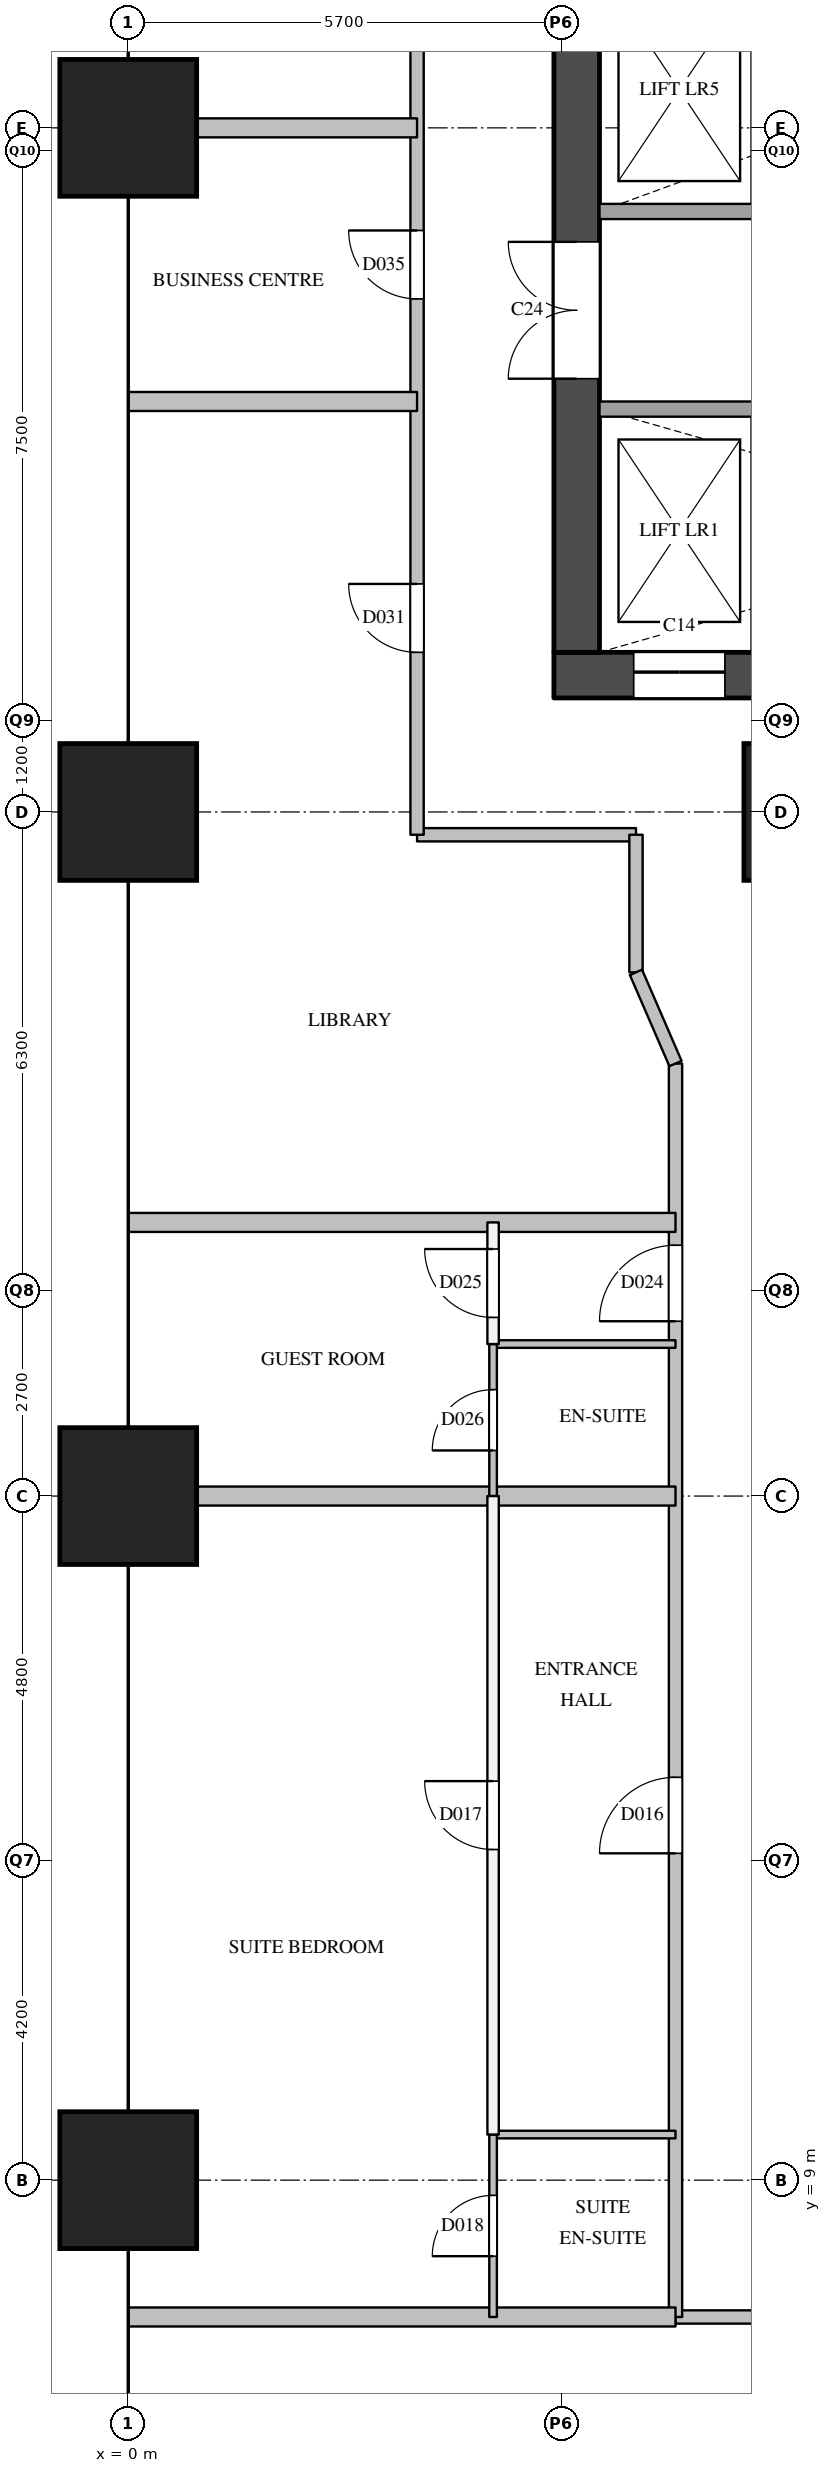
"""IFC4 building model, lengths in metres.
Left out: names, types, materials, properties, quantities, classifications, styles, units other than length and angle.
Written with IfcOpenShell. Run it as: python <this file> out.ifc"""

import sys

from ifc_helpers import new_model, si_unit, direction, frame, frame_2d, origin, origin_2d, place, context, subcontext, project, spatial, rectangle, extrude, element, fill, save


model = new_model("IFC4")
c1 = context("Model", 3, precision=1e-05, world=origin(), true_north=direction((0.0, 1.0)))
c2 = subcontext(c1, "Body", "Model", "MODEL_VIEW")
j1 = project(units=[si_unit("LENGTHUNIT", "METRE"), si_unit("PLANEANGLEUNIT", "RADIAN")], contexts=[c1])
p1 = place(None, origin())
s1 = spatial("IfcSite", under=j1, at=p1, CompositionType="ELEMENT")
p2 = place(p1, origin())
s2 = spatial("IfcBuilding", under=s1, at=p2, CompositionType="ELEMENT")
p3 = place(p2, frame((0.0, 0.0, 57.6)))
s3 = spatial("IfcBuildingStorey", under=s2, at=p3, CompositionType="ELEMENT", Elevation=57.6)
for number, where, z_axis, x_axis in (
    (1, (0.0, 9.0, 0.0), (0.0, 0.0, 1.0), (1.0, 0.0, 0.0)),
    (2, (0.0, 18.0, 0.0), (0.0, 0.0, 1.0), (1.0, 0.0, 0.0)),
    (3, (0.0, 27.0, 0.0), (0.0, 0.0, 1.0), (1.0, 0.0, 0.0)),
    (4, (0.0, 36.0, 0.0), (0.0, 0.0, 1.0), (1.0, 0.0, 0.0)),
    (5, (9.0, 27.0, 0.0), (0.0, 0.0, 1.0), (1.0, 0.0, 0.0)),
):
    element("IfcColumn", number, at=place(p3, frame(where, z_axis=z_axis, x_axis=x_axis)), inside=s3, PredefinedType="COLUMN", context=c2, shape_type="SweptSolid", body=[
        extrude(rectangle(XDim=1.8, YDim=1.8, at=origin_2d()), origin(), (0.0, 0.0, 1.0), 3.8),
    ])
p4 = place(p3, frame((5.6, 28.8, 0.0), z_axis=(0.0, 0.0, 1.0), x_axis=(1.0, 0.0, 0.0)))
e6 = element("IfcWall", 6, at=p4, inside=s3, PredefinedType="SHEAR", context=c2, shape_type="SweptSolid", body=[
    extrude(rectangle(XDim=12.4, YDim=0.6, at=frame_2d((6.2, 0.0))), origin(), (0.0, 0.0, 1.0), 3.5),
])
p5 = place(p4, frame((1.05, 0.0, 0.0)))
e7 = element("IfcOpeningElement", 7, at=p5, cuts=e6, PredefinedType="OPENING", context=c2, shape_type="SweptSolid", body=[
    extrude(rectangle(XDim=1.2, YDim=2.1, at=frame_2d((0.6, 1.05))), frame((0.0, 0.31, 0.0), z_axis=(0.0, -1.0, 0.0), x_axis=(1.0, 0.0, 0.0)), (0.0, 0.0, 1.0), 0.62),
])
p6 = place(p4, frame((5.25, 0.0, 0.0)))
e8 = element("IfcOpeningElement", 8, at=p6, cuts=e6, PredefinedType="OPENING", context=c2, shape_type="SweptSolid", body=[
    extrude(rectangle(XDim=1.2, YDim=2.1, at=frame_2d((0.6, 1.05))), frame((0.0, 0.31, 0.0), z_axis=(0.0, -1.0, 0.0), x_axis=(1.0, 0.0, 0.0)), (0.0, 0.0, 1.0), 0.62),
])
p7 = place(p4, frame((7.35, 0.0, 0.0)))
e9 = element("IfcOpeningElement", 9, at=p7, cuts=e6, PredefinedType="OPENING", context=c2, shape_type="SweptSolid", body=[
    extrude(rectangle(XDim=1.2, YDim=2.1, at=frame_2d((0.6, 1.05))), frame((0.0, 0.31, 0.0), z_axis=(0.0, -1.0, 0.0), x_axis=(1.0, 0.0, 0.0)), (0.0, 0.0, 1.0), 0.62),
])
p8 = place(p3, frame((5.9, 29.1, 0.0), z_axis=(0.0, 0.0, 1.0), x_axis=(0.0, 1.0, 0.0)))
e10 = element("IfcWall", 10, at=p8, inside=s3, PredefinedType="SHEAR", context=c2, shape_type="SweptSolid", body=[
    extrude(rectangle(XDim=20.3, YDim=0.6, at=frame_2d((10.15, 0.0))), origin(), (0.0, 0.0, 1.0), 3.5),
])
p9 = place(p8, frame((3.6, 0.0, 0.0)))
e11 = element("IfcOpeningElement", 11, at=p9, cuts=e10, PredefinedType="OPENING", context=c2, shape_type="SweptSolid", body=[
    extrude(rectangle(XDim=1.8, YDim=2.1, at=frame_2d((0.9, 1.05))), frame((0.0, 0.31, 0.0), z_axis=(0.0, -1.0, 0.0), x_axis=(1.0, 0.0, 0.0)), (0.0, 0.0, 1.0), 0.62),
])
p10 = place(p8, frame((16.4, 0.0, 0.0)))
e12 = element("IfcOpeningElement", 12, at=p10, cuts=e10, PredefinedType="OPENING", context=c2, shape_type="SweptSolid", body=[
    extrude(rectangle(XDim=1.0, YDim=2.1, at=frame_2d((0.5, 1.05))), frame((0.0, 0.31, 0.0), z_axis=(0.0, -1.0, 0.0), x_axis=(1.0, 0.0, 0.0)), (0.0, 0.0, 1.0), 0.62),
])
p11 = place(p3, frame((6.2, 32.3, 0.0), z_axis=(0.0, 0.0, 1.0), x_axis=(1.0, 0.0, 0.0)))
e13 = element("IfcWall", 13, at=p11, inside=s3, PredefinedType="SOLIDWALL", context=c2, shape_type="SweptSolid", body=[
    extrude(rectangle(XDim=11.2, YDim=0.2, at=frame_2d((5.6, 0.0))), origin(), (0.0, 0.0, 1.0), 3.5),
])
p12 = place(p11, frame((2.55, 0.0, 0.0)))
e14 = element("IfcOpeningElement", 14, at=p12, cuts=e13, PredefinedType="OPENING", context=c2, shape_type="SweptSolid", body=[
    extrude(rectangle(XDim=1.2, YDim=2.1, at=frame_2d((0.6, 1.05))), frame((0.0, 0.11, 0.0), z_axis=(0.0, -1.0, 0.0), x_axis=(1.0, 0.0, 0.0)), (0.0, 0.0, 1.0), 0.22),
])
p13 = place(p3, frame((6.2, 34.9, 0.0), z_axis=(0.0, 0.0, 1.0), x_axis=(1.0, 0.0, 0.0)))
e15 = element("IfcWall", 15, at=p13, inside=s3, PredefinedType="SOLIDWALL", context=c2, shape_type="SweptSolid", body=[
    extrude(rectangle(XDim=11.2, YDim=0.2, at=frame_2d((5.6, 0.0))), origin(), (0.0, 0.0, 1.0), 3.5),
])
p14 = place(p3, frame((7.2, 7.2, 0.0), z_axis=(0.0, 0.0, 1.0), x_axis=(1.0, 0.0, 0.0)))
e16 = element("IfcWall", 16, at=p14, inside=s3, PredefinedType="PARTITIONING", context=c2, shape_type="SweptSolid", body=[
    extrude(rectangle(XDim=12.6, YDim=0.175, at=frame_2d((6.3, 0.0))), origin(), (0.0, 0.0, 1.0), 3.5),
])
p15 = place(p14, frame((7.5, 0.0, 0.0)))
e17 = element("IfcOpeningElement", 17, at=p15, cuts=e16, PredefinedType="OPENING", context=c2, shape_type="SweptSolid", body=[
    extrude(rectangle(XDim=1.0, YDim=2.1, at=frame_2d((0.5, 1.05))), frame((0.0, 0.097, 0.0), z_axis=(0.0, -1.0, 0.0), x_axis=(1.0, 0.0, 0.0)), (0.0, 0.0, 1.0), 0.195),
])
p16 = place(p14, frame((1.9, 0.0, 0.0)))
e18 = element("IfcOpeningElement", 18, at=p16, cuts=e16, PredefinedType="OPENING", context=c2, shape_type="SweptSolid", body=[
    extrude(rectangle(XDim=1.0, YDim=2.1, at=frame_2d((0.5, 1.05))), frame((0.0, 0.097, 0.0), z_axis=(0.0, -1.0, 0.0), x_axis=(1.0, 0.0, 0.0)), (0.0, 0.0, 1.0), 0.195),
])
p17 = place(p3, frame((3.8, 26.7, 0.0), z_axis=(0.0, 0.0, 1.0), x_axis=(1.0, 0.0, 0.0)))
e19 = element("IfcWall", 19, at=p17, inside=s3, PredefinedType="PARTITIONING", context=c2, shape_type="SweptSolid", body=[
    extrude(rectangle(XDim=2.88, YDim=0.175, at=frame_2d((1.44, 0.0))), origin(), (0.0, 0.0, 1.0), 2.5),
])
p18 = place(p3, frame((3.8, 26.7, 0.0), z_axis=(0.0, 0.0, 1.0), x_axis=(0.0, 1.0, 0.0)))
e20 = element("IfcWall", 20, at=p18, inside=s3, PredefinedType="PARTITIONING", context=c2, shape_type="SweptSolid", body=[
    extrude(rectangle(XDim=25.1, YDim=0.175, at=frame_2d((12.55, 0.0))), origin(), (0.0, 0.0, 1.0), 2.5),
])
p19 = place(p18, frame((2.4, 0.0, 0.0)))
e21 = element("IfcOpeningElement", 21, at=p19, cuts=e20, PredefinedType="OPENING", context=c2, shape_type="SweptSolid", body=[
    extrude(rectangle(XDim=0.9, YDim=2.1, at=frame_2d((0.45, 1.05))), frame((0.0, 0.097, 0.0), z_axis=(0.0, -1.0, 0.0), x_axis=(1.0, 0.0, 0.0)), (0.0, 0.0, 1.0), 0.195),
])
p20 = place(p18, frame((7.05, 0.0, 0.0)))
e22 = element("IfcOpeningElement", 22, at=p20, cuts=e20, PredefinedType="OPENING", context=c2, shape_type="SweptSolid", body=[
    extrude(rectangle(XDim=0.9, YDim=2.1, at=frame_2d((0.45, 1.05))), frame((0.0, 0.097, 0.0), z_axis=(0.0, -1.0, 0.0), x_axis=(1.0, 0.0, 0.0)), (0.0, 0.0, 1.0), 0.195),
])
p21 = place(p18, frame((12.45, 0.0, 0.0)))
e23 = element("IfcOpeningElement", 23, at=p21, cuts=e20, PredefinedType="OPENING", context=c2, shape_type="SweptSolid", body=[
    extrude(rectangle(XDim=0.9, YDim=2.1, at=frame_2d((0.45, 1.05))), frame((0.0, 0.097, 0.0), z_axis=(0.0, -1.0, 0.0), x_axis=(1.0, 0.0, 0.0)), (0.0, 0.0, 1.0), 0.195),
])
p22 = place(p18, frame((20.35, 0.0, 0.0)))
e24 = element("IfcOpeningElement", 24, at=p22, cuts=e20, PredefinedType="OPENING", context=c2, shape_type="SweptSolid", body=[
    extrude(rectangle(XDim=0.9, YDim=2.1, at=frame_2d((0.45, 1.05))), frame((0.0, 0.097, 0.0), z_axis=(0.0, -1.0, 0.0), x_axis=(1.0, 0.0, 0.0)), (0.0, 0.0, 1.0), 0.195),
])
p23 = place(p3, frame((6.68, 24.89, 0.0), z_axis=(0.0, 0.0, 1.0), x_axis=(0.0, 1.0, 0.0)))
e25 = element("IfcWall", 25, at=p23, inside=s3, PredefinedType="PARTITIONING", context=c2, shape_type="SweptSolid", body=[
    extrude(rectangle(XDim=1.81, YDim=0.175, at=frame_2d((0.905, 0.0))), origin(), (0.0, 0.0, 1.0), 2.5),
])
p24 = place(p3, frame((7.2, 7.2, 0.0), z_axis=(0.0, 0.0, 1.0), x_axis=(0.0, 1.0, 0.0)))
e26 = element("IfcWall", 26, at=p24, inside=s3, PredefinedType="PARTITIONING", context=c2, shape_type="SweptSolid", body=[
    extrude(rectangle(XDim=16.49, YDim=0.175, at=frame_2d((8.245, 0.0))), origin(), (0.0, 0.0, 1.0), 3.5),
])
p25 = place(p24, frame((6.1, 0.0, 0.0)))
e27 = element("IfcOpeningElement", 27, at=p25, cuts=e26, PredefinedType="OPENING", context=c2, shape_type="SweptSolid", body=[
    extrude(rectangle(XDim=1.0, YDim=2.1, at=frame_2d((0.5, 1.05))), frame((0.0, 0.097, 0.0), z_axis=(0.0, -1.0, 0.0), x_axis=(1.0, 0.0, 0.0)), (0.0, 0.0, 1.0), 0.195),
])
p26 = place(p24, frame((13.1, 0.0, 0.0)))
e28 = element("IfcOpeningElement", 28, at=p26, cuts=e26, PredefinedType="OPENING", context=c2, shape_type="SweptSolid", body=[
    extrude(rectangle(XDim=1.0, YDim=2.1, at=frame_2d((0.5, 1.05))), frame((0.0, 0.097, 0.0), z_axis=(0.0, -1.0, 0.0), x_axis=(1.0, 0.0, 0.0)), (0.0, 0.0, 1.0), 0.195),
])
p27 = place(p3, frame((4.8, 9.6, 0.0), z_axis=(0.0, 0.0, 1.0), x_axis=(0.0, 1.0, 0.0)))
e29 = element("IfcWall", 29, at=p27, inside=s3, PredefinedType="PARTITIONING", context=c2, shape_type="SweptSolid", body=[
    extrude(rectangle(XDim=8.4, YDim=0.15, at=frame_2d((4.2, 0.0))), origin(), (0.0, 0.0, 1.0), 3.5),
])
p28 = place(p27, frame((3.75, 0.0, 0.0)))
e30 = element("IfcOpeningElement", 30, at=p28, cuts=e29, PredefinedType="OPENING", context=c2, shape_type="SweptSolid", body=[
    extrude(rectangle(XDim=0.9, YDim=2.1, at=frame_2d((0.45, 1.05))), frame((0.0, 0.085, 0.0), z_axis=(0.0, -1.0, 0.0), x_axis=(1.0, 0.0, 0.0)), (0.0, 0.0, 1.0), 0.17),
])
p29 = place(p3, frame((4.8, 20.0, 0.0), z_axis=(0.0, 0.0, 1.0), x_axis=(0.0, 1.0, 0.0)))
e31 = element("IfcWall", 31, at=p29, inside=s3, PredefinedType="PARTITIONING", context=c2, shape_type="SweptSolid", body=[
    extrude(rectangle(XDim=1.6, YDim=0.15, at=frame_2d((0.8, 0.0))), origin(), (0.0, 0.0, 1.0), 3.5),
])
p30 = place(p29, frame((0.35, 0.0, 0.0)))
e32 = element("IfcOpeningElement", 32, at=p30, cuts=e31, PredefinedType="OPENING", context=c2, shape_type="SweptSolid", body=[
    extrude(rectangle(XDim=0.9, YDim=2.1, at=frame_2d((0.45, 1.05))), frame((0.0, 0.085, 0.0), z_axis=(0.0, -1.0, 0.0), x_axis=(1.0, 0.0, 0.0)), (0.0, 0.0, 1.0), 0.17),
])
p31 = place(p3, frame((0.0, 7.2, 0.0), z_axis=(0.0, 0.0, 1.0), x_axis=(1.0, 0.0, 0.0)))
e33 = element("IfcWall", 33, at=p31, inside=s3, PredefinedType="PARTITIONING", context=c2, shape_type="SweptSolid", body=[
    extrude(rectangle(XDim=7.2, YDim=0.25, at=frame_2d((3.6, 0.0))), origin(), (0.0, 0.0, 1.0), 2.5),
])
p32 = place(p3, frame((0.0, 18.0, 0.0), z_axis=(0.0, 0.0, 1.0), x_axis=(1.0, 0.0, 0.0)))
e34 = element("IfcWall", 34, at=p32, inside=s3, PredefinedType="PARTITIONING", context=c2, shape_type="SweptSolid", body=[
    extrude(rectangle(XDim=7.2, YDim=0.25, at=frame_2d((3.6, 0.0))), origin(), (0.0, 0.0, 1.0), 3.5),
])
p33 = place(p3, frame((0.0, 21.6, 0.0), z_axis=(0.0, 0.0, 1.0), x_axis=(1.0, 0.0, 0.0)))
e35 = element("IfcWall", 35, at=p33, inside=s3, PredefinedType="PARTITIONING", context=c2, shape_type="SweptSolid", body=[
    extrude(rectangle(XDim=7.2, YDim=0.25, at=frame_2d((3.6, 0.0))), origin(), (0.0, 0.0, 1.0), 2.5),
])
p34 = place(p3, frame((0.0, 32.4, 0.0), z_axis=(0.0, 0.0, 1.0), x_axis=(1.0, 0.0, 0.0)))
e36 = element("IfcWall", 36, at=p34, inside=s3, PredefinedType="PARTITIONING", context=c2, shape_type="SweptSolid", body=[
    extrude(rectangle(XDim=3.8, YDim=0.25, at=frame_2d((1.9, 0.0))), origin(), (0.0, 0.0, 1.0), 2.5),
])
p35 = place(p3, frame((0.0, 36.0, 0.0), z_axis=(0.0, 0.0, 1.0), x_axis=(1.0, 0.0, 0.0)))
e37 = element("IfcWall", 37, at=p35, inside=s3, PredefinedType="PARTITIONING", context=c2, shape_type="SweptSolid", body=[
    extrude(rectangle(XDim=3.8, YDim=0.25, at=frame_2d((1.9, 0.0))), origin(), (0.0, 0.0, 1.0), 3.5),
])
for number, where, z_axis, x_axis in (
    (38, (4.8, 9.6, 0.0), (0.0, 0.0, 1.0), (1.0, 0.0, 0.0)),
    (39, (4.8, 20.0, 0.0), (0.0, 0.0, 1.0), (1.0, 0.0, 0.0)),
):
    element("IfcWall", number, at=place(p3, frame(where, z_axis=z_axis, x_axis=x_axis)), inside=s3, PredefinedType="PARTITIONING", context=c2, shape_type="SweptSolid", body=[
        extrude(rectangle(XDim=2.4, YDim=0.1, at=frame_2d((1.2, 0.0))), origin(), (0.0, 0.0, 1.0), 3.5),
    ])
p36 = place(p3, frame((4.8, 7.2, 0.0), z_axis=(0.0, 0.0, 1.0), x_axis=(0.0, 1.0, 0.0)))
e40 = element("IfcWall", 40, at=p36, inside=s3, PredefinedType="PARTITIONING", context=c2, shape_type="SweptSolid", body=[
    extrude(rectangle(XDim=2.4, YDim=0.1, at=frame_2d((1.2, 0.0))), origin(), (0.0, 0.0, 1.0), 3.5),
])
p37 = place(p36, frame((0.8, 0.0, 0.0)))
e41 = element("IfcOpeningElement", 41, at=p37, cuts=e40, PredefinedType="OPENING", context=c2, shape_type="SweptSolid", body=[
    extrude(rectangle(XDim=0.8, YDim=2.1, at=frame_2d((0.4, 1.05))), frame((0.0, 0.06, 0.0), z_axis=(0.0, -1.0, 0.0), x_axis=(1.0, 0.0, 0.0)), (0.0, 0.0, 1.0), 0.12),
])
p38 = place(p3, frame((4.8, 18.0, 0.0), z_axis=(0.0, 0.0, 1.0), x_axis=(0.0, 1.0, 0.0)))
e42 = element("IfcWall", 42, at=p38, inside=s3, PredefinedType="PARTITIONING", context=c2, shape_type="SweptSolid", body=[
    extrude(rectangle(XDim=2.0, YDim=0.1, at=frame_2d((1.0, 0.0))), origin(), (0.0, 0.0, 1.0), 3.5),
])
p39 = place(p38, frame((0.6, 0.0, 0.0)))
e43 = element("IfcOpeningElement", 43, at=p39, cuts=e42, PredefinedType="OPENING", context=c2, shape_type="SweptSolid", body=[
    extrude(rectangle(XDim=0.8, YDim=2.1, at=frame_2d((0.4, 1.05))), frame((0.0, 0.06, 0.0), z_axis=(0.0, -1.0, 0.0), x_axis=(1.0, 0.0, 0.0)), (0.0, 0.0, 1.0), 0.12),
])
p40 = place(p3, frame((7.2, 23.69, 0.0), z_axis=(0.0, 0.0, 1.0), x_axis=(-0.397633632391, 0.917544273804, 0.0)))
e44 = element("IfcWall", 44, at=p40, inside=s3, PredefinedType="PARTITIONING", context=c2, shape_type="SweptSolid", body=[
    extrude(rectangle(XDim=1.308, YDim=0.175, at=frame_2d((0.654, 0.0))), origin(), (0.0, 0.0, 1.0), 3.5),
])
p41 = place(p5, origin())
e45 = element("IfcDoor", 45, at=p41, inside=s3, OperationType="SLIDING_TO_LEFT", PredefinedType="DOOR", context=c2, shape_type="SweptSolid", body=[
    extrude(rectangle(XDim=1.2, YDim=2.1, at=frame_2d((0.6, 1.05))), frame((0.0, 0.025, 0.0), z_axis=(0.0, -1.0, 0.0), x_axis=(1.0, 0.0, 0.0)), (0.0, 0.0, 1.0), 0.05),
])
fill(e7, e45)
p42 = place(p9, origin())
e46 = element("IfcDoor", 46, at=p42, inside=s3, OperationType="DOUBLE_DOOR_SINGLE_SWING", PredefinedType="DOOR", context=c2, shape_type="SweptSolid", body=[
    extrude(rectangle(XDim=1.8, YDim=2.1, at=frame_2d((0.9, 1.05))), frame((0.0, 0.025, 0.0), z_axis=(0.0, -1.0, 0.0), x_axis=(1.0, 0.0, 0.0)), (0.0, 0.0, 1.0), 0.05),
])
fill(e11, e46)
p43 = place(p25, origin())
e47 = element("IfcDoor", 47, at=p43, inside=s3, OperationType="SINGLE_SWING_LEFT", PredefinedType="DOOR", context=c2, shape_type="SweptSolid", body=[
    extrude(rectangle(XDim=1.0, YDim=2.1, at=frame_2d((0.5, 1.05))), frame((0.0, 0.025, 0.0), z_axis=(0.0, -1.0, 0.0), x_axis=(1.0, 0.0, 0.0)), (0.0, 0.0, 1.0), 0.05),
])
fill(e27, e47)
p44 = place(p28, origin())
e48 = element("IfcDoor", 48, at=p44, inside=s3, OperationType="SINGLE_SWING_RIGHT", PredefinedType="DOOR", context=c2, shape_type="SweptSolid", body=[
    extrude(rectangle(XDim=0.9, YDim=2.1, at=frame_2d((0.45, 1.05))), frame((0.0, 0.025, 0.0), z_axis=(0.0, -1.0, 0.0), x_axis=(1.0, 0.0, 0.0)), (0.0, 0.0, 1.0), 0.05),
])
fill(e30, e48)
p45 = place(p37, origin())
e49 = element("IfcDoor", 49, at=p45, inside=s3, OperationType="SINGLE_SWING_LEFT", PredefinedType="DOOR", context=c2, shape_type="SweptSolid", body=[
    extrude(rectangle(XDim=0.8, YDim=2.1, at=frame_2d((0.4, 1.05))), frame((0.0, 0.025, 0.0), z_axis=(0.0, -1.0, 0.0), x_axis=(1.0, 0.0, 0.0)), (0.0, 0.0, 1.0), 0.05),
])
fill(e41, e49)
p46 = place(p26, origin())
e50 = element("IfcDoor", 50, at=p46, inside=s3, OperationType="SINGLE_SWING_LEFT", PredefinedType="DOOR", context=c2, shape_type="SweptSolid", body=[
    extrude(rectangle(XDim=1.0, YDim=2.1, at=frame_2d((0.5, 1.05))), frame((0.0, 0.025, 0.0), z_axis=(0.0, -1.0, 0.0), x_axis=(1.0, 0.0, 0.0)), (0.0, 0.0, 1.0), 0.05),
])
fill(e28, e50)
p47 = place(p30, origin())
e51 = element("IfcDoor", 51, at=p47, inside=s3, OperationType="SINGLE_SWING_RIGHT", PredefinedType="DOOR", context=c2, shape_type="SweptSolid", body=[
    extrude(rectangle(XDim=0.9, YDim=2.1, at=frame_2d((0.45, 1.05))), frame((0.0, 0.025, 0.0), z_axis=(0.0, -1.0, 0.0), x_axis=(1.0, 0.0, 0.0)), (0.0, 0.0, 1.0), 0.05),
])
fill(e32, e51)
p48 = place(p39, origin())
e52 = element("IfcDoor", 52, at=p48, inside=s3, OperationType="SINGLE_SWING_LEFT", PredefinedType="DOOR", context=c2, shape_type="SweptSolid", body=[
    extrude(rectangle(XDim=0.8, YDim=2.1, at=frame_2d((0.4, 1.05))), frame((0.0, 0.025, 0.0), z_axis=(0.0, -1.0, 0.0), x_axis=(1.0, 0.0, 0.0)), (0.0, 0.0, 1.0), 0.05),
])
fill(e43, e52)
p49 = place(p19, origin())
e53 = element("IfcDoor", 53, at=p49, inside=s3, OperationType="SINGLE_SWING_RIGHT", PredefinedType="DOOR", context=c2, shape_type="SweptSolid", body=[
    extrude(rectangle(XDim=0.9, YDim=2.1, at=frame_2d((0.45, 1.05))), frame((0.0, 0.025, 0.0), z_axis=(0.0, -1.0, 0.0), x_axis=(1.0, 0.0, 0.0)), (0.0, 0.0, 1.0), 0.05),
])
fill(e21, e53)
p50 = place(p20, origin())
e54 = element("IfcDoor", 54, at=p50, inside=s3, OperationType="SINGLE_SWING_RIGHT", PredefinedType="DOOR", context=c2, shape_type="SweptSolid", body=[
    extrude(rectangle(XDim=0.9, YDim=2.1, at=frame_2d((0.45, 1.05))), frame((0.0, 0.025, 0.0), z_axis=(0.0, -1.0, 0.0), x_axis=(1.0, 0.0, 0.0)), (0.0, 0.0, 1.0), 0.05),
])
fill(e22, e54)
save(model, sys.argv[1])
